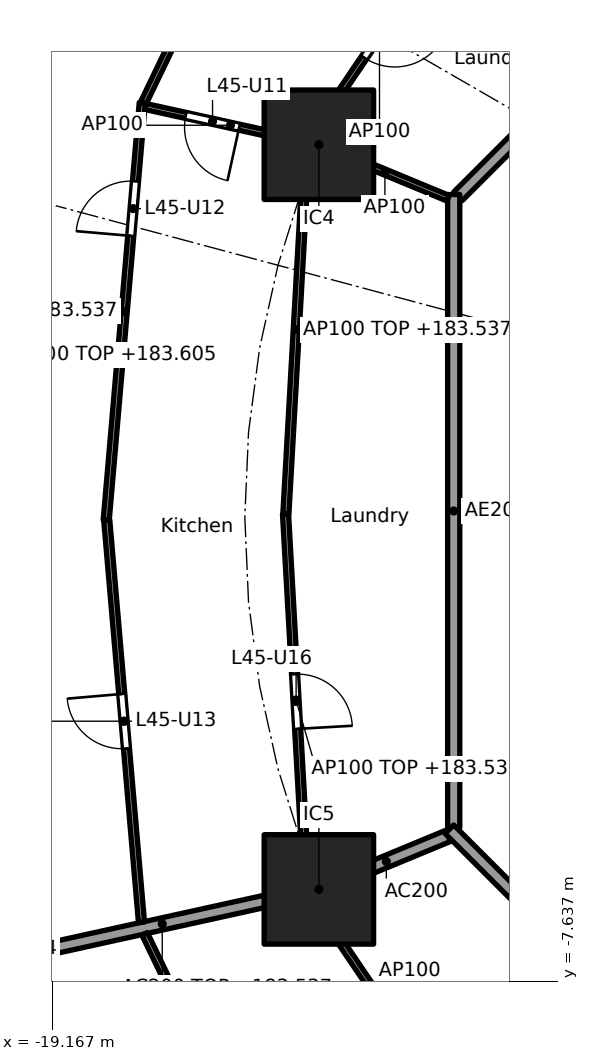
"""IFC4 building model, lengths in metres.
Left out: names, types, materials, properties, quantities, classifications, styles, units other than length and angle.
Written with IfcOpenShell. Run it as: python <this file> out.ifc"""

import sys

from ifc_helpers import new_model, si_unit, direction, frame, frame_2d, origin, origin_2d, place, context, subcontext, project, spatial, rectangle, extrude, element, fill, save


model = new_model("IFC4")
c1 = context("Model", 3, precision=1e-05, world=origin(), true_north=direction((0.0, 1.0)))
c2 = subcontext(c1, "Body", "Model", "MODEL_VIEW")
j1 = project(units=[si_unit("LENGTHUNIT", "METRE"), si_unit("PLANEANGLEUNIT", "RADIAN")], contexts=[c1])
p1 = place(None, origin())
s1 = spatial("IfcSite", under=j1, at=p1, CompositionType="ELEMENT")
p2 = place(p1, origin())
s2 = spatial("IfcBuilding", under=s1, at=p2, CompositionType="ELEMENT")
p3 = place(p2, frame((0.0, 0.0, 180.7)))
s3 = spatial("IfcBuildingStorey", under=s2, at=p3, CompositionType="ELEMENT", Elevation=180.7)
for number, where, z_axis, x_axis in (
    (1, (-14.782, 6.123, 0.0), (0.0, 0.0, 1.0), (1.0, 0.0, 0.0)),
    (2, (-14.782, -6.123, 0.0), (0.0, 0.0, 1.0), (1.0, 0.0, 0.0)),
):
    element("IfcColumn", number, at=place(p3, frame(where, z_axis=z_axis, x_axis=x_axis)), inside=s3, PredefinedType="COLUMN", context=c2, shape_type="SweptSolid", body=[
        extrude(rectangle(XDim=1.8, YDim=1.8, at=origin_2d()), origin(), (0.0, 0.0, 1.0), 3.7),
    ])
p4 = place(p3, frame((-12.657, -5.243, 0.0), z_axis=(0.0, 0.0, 1.0), x_axis=(-0.923859888513, -0.38273085373, 0.0)))
e3 = element("IfcWall", 3, at=p4, inside=s3, PredefinedType="PARTITIONING", context=c2, shape_type="SweptSolid", body=[
    extrude(rectangle(XDim=2.199, YDim=0.2, at=frame_2d((1.1, 0.0))), origin(), (0.0, 0.0, 1.0), 3.44),
])
p5 = place(p3, frame((-14.831, -6.134, 0.0), z_axis=(0.0, 0.0, 1.0), x_axis=(-0.976568396888, -0.215207263354, 0.0)))
e4 = element("IfcWall", 4, at=p5, inside=s3, PredefinedType="PARTITIONING", context=c2, shape_type="SweptSolid", body=[
    extrude(rectangle(XDim=5.177, YDim=0.2, at=frame_2d((2.588, 0.0))), origin(), (0.0, 0.0, 1.0), 2.837),
])
p6 = place(p3, frame((-5.275, 12.494, 0.0), z_axis=(0.0, 0.0, 1.0), x_axis=(-0.707106781187, -0.707106781187, 0.0)))
e5 = element("IfcWall", 5, at=p6, inside=s3, PredefinedType="PARTITIONING", context=c2, shape_type="SweptSolid", body=[
    extrude(rectangle(XDim=10.209, YDim=0.2, at=frame_2d((5.104, 0.0))), origin(), (0.0, 0.0, 1.0), 3.44),
])
p7 = place(p3, frame((-12.565, 5.304, 0.0), z_axis=(0.0, 0.0, 1.0), x_axis=(0.0, -1.0, 0.0)))
e6 = element("IfcWall", 6, at=p7, inside=s3, PredefinedType="PARTITIONING", context=c2, shape_type="SweptSolid", body=[
    extrude(rectangle(XDim=10.409, YDim=0.2, at=frame_2d((5.205, 0.0))), origin(), (0.0, 0.0, 1.0), 3.44),
])
p8 = place(p3, frame((-12.635, -5.134, 0.0), z_axis=(0.0, 0.0, 1.0), x_axis=(0.707106781187, -0.707106781187, 0.0)))
e7 = element("IfcWall", 7, at=p8, inside=s3, PredefinedType="PARTITIONING", context=c2, shape_type="SweptSolid", body=[
    extrude(rectangle(XDim=10.609, YDim=0.2, at=frame_2d((5.305, 0.0))), origin(), (0.0, 0.0, 1.0), 3.44),
])
p9 = place(p3, frame((-12.619, 9.65, 0.0), z_axis=(0.0, 0.0, 1.0), x_axis=(-0.561064907171, -0.827771810308, 0.0)))
e8 = element("IfcWall", 8, at=p9, inside=s3, PredefinedType="PARTITIONING", context=c2, shape_type="SweptSolid", body=[
    extrude(rectangle(XDim=4.159, YDim=0.1, at=frame_2d((2.079, 0.0))), origin(), (0.0, 0.0, 1.0), 3.44),
])
p10 = place(p9, frame((1.629, 0.0, 0.0)))
e9 = element("IfcOpeningElement", 9, at=p10, cuts=e8, PredefinedType="OPENING", context=c2, shape_type="SweptSolid", body=[
    extrude(rectangle(XDim=0.9, YDim=2.1, at=frame_2d((0.45, 1.05))), frame((0.0, 0.06, 0.0), z_axis=(0.0, -1.0, 0.0), x_axis=(1.0, 0.0, 0.0)), (0.0, 0.0, 1.0), 0.12),
])
p11 = place(p3, frame((-15.257, 11.816, 0.0), z_axis=(0.0, 0.0, 1.0), x_axis=(-0.434040130629, -0.900893536997, 0.0)))
e10 = element("IfcWall", 10, at=p11, inside=s3, PredefinedType="PARTITIONING", context=c2, shape_type="SweptSolid", body=[
    extrude(rectangle(XDim=5.558, YDim=0.1, at=frame_2d((2.779, 0.0))), origin(), (0.0, 0.0, 1.0), 3.44),
])
p12 = place(p3, frame((-12.657, 5.243, 0.0), z_axis=(0.0, 0.0, 1.0), x_axis=(-0.923848837015, 0.382757529444, 0.0)))
e11 = element("IfcWall", 11, at=p12, inside=s3, PredefinedType="PARTITIONING", context=c2, shape_type="SweptSolid", body=[
    extrude(rectangle(XDim=2.25, YDim=0.1, at=frame_2d((1.125, 0.0))), origin(), (0.0, 0.0, 1.0), 3.44),
])
p13 = place(p3, frame((-14.831, 6.134, 0.0), z_axis=(0.0, 0.0, 1.0), x_axis=(-0.976560749847, 0.215241961191, 0.0)))
e12 = element("IfcWall", 12, at=p13, inside=s3, PredefinedType="PARTITIONING", context=c2, shape_type="SweptSolid", body=[
    extrude(rectangle(XDim=2.879, YDim=0.1, at=frame_2d((1.439, 0.0))), origin(), (0.0, 0.0, 1.0), 3.44),
])
p14 = place(p13, frame((1.291, 0.0, 0.0)))
e13 = element("IfcOpeningElement", 13, at=p14, cuts=e12, PredefinedType="OPENING", context=c2, shape_type="SweptSolid", body=[
    extrude(rectangle(XDim=0.9, YDim=2.1, at=frame_2d((0.45, 1.05))), frame((0.0, 0.06, 0.0), z_axis=(0.0, -1.0, 0.0), x_axis=(1.0, 0.0, 0.0)), (0.0, 0.0, 1.0), 0.12),
])
p15 = place(p3, frame((-14.983, 6.117, 0.0), z_axis=(0.0, 0.0, 1.0), x_axis=(-0.056328933432, -0.998412265178, 0.0)))
e14 = element("IfcWall", 14, at=p15, inside=s3, PredefinedType="PARTITIONING", context=c2, shape_type="SweptSolid", body=[
    extrude(rectangle(XDim=6.077, YDim=0.1, at=frame_2d((3.038, 0.0))), origin(), (0.0, 0.0, 1.0), 2.837),
])
p16 = place(p3, frame((-17.687, 6.814, 0.0), z_axis=(0.0, 0.0, 1.0), x_axis=(-0.086010249709, -0.996294252189, 0.0)))
e15 = element("IfcWall", 15, at=p16, inside=s3, PredefinedType="PARTITIONING", context=c2, shape_type="SweptSolid", body=[
    extrude(rectangle(XDim=6.889, YDim=0.1, at=frame_2d((3.445, 0.0))), origin(), (0.0, 0.0, 1.0), 2.837),
])
p17 = place(p16, frame((1.297, 0.0, 0.0)))
e16 = element("IfcOpeningElement", 16, at=p17, cuts=e15, PredefinedType="OPENING", context=c2, shape_type="SweptSolid", body=[
    extrude(rectangle(XDim=0.9, YDim=2.1, at=frame_2d((0.45, 1.05))), frame((0.0, 0.06, 0.0), z_axis=(0.0, -1.0, 0.0), x_axis=(1.0, 0.0, 0.0)), (0.0, 0.0, 1.0), 0.12),
])
p18 = place(p3, frame((-18.033, 3.387, 0.0), z_axis=(0.0, 0.0, 1.0), x_axis=(-0.994194772207, 0.107595329438, 0.0)))
e17 = element("IfcWall", 17, at=p18, inside=s3, PredefinedType="PARTITIONING", context=c2, shape_type="SweptSolid", body=[
    extrude(rectangle(XDim=3.506, YDim=0.1, at=frame_2d((1.753, 0.0))), origin(), (0.0, 0.0, 1.0), 2.905),
])
p19 = place(p3, frame((-15.331, 0.05, 0.0), z_axis=(0.0, 0.0, 1.0), x_axis=(0.056310939406, -0.998413280212, 0.0)))
e18 = element("IfcWall", 18, at=p19, inside=s3, PredefinedType="PARTITIONING", context=c2, shape_type="SweptSolid", body=[
    extrude(rectangle(XDim=6.126, YDim=0.1, at=frame_2d((3.063, 0.0))), origin(), (0.0, 0.0, 1.0), 2.837),
])
p20 = place(p19, frame((2.638, 0.0, 0.0)))
e19 = element("IfcOpeningElement", 19, at=p20, cuts=e18, PredefinedType="OPENING", context=c2, shape_type="SweptSolid", body=[
    extrude(rectangle(XDim=0.9, YDim=2.1, at=frame_2d((0.45, 1.05))), frame((0.0, 0.06, 0.0), z_axis=(0.0, -1.0, 0.0), x_axis=(1.0, 0.0, 0.0)), (0.0, 0.0, 1.0), 0.12),
])
p21 = place(p3, frame((-18.271, -0.05, 0.0), z_axis=(0.0, 0.0, 1.0), x_axis=(0.086012321907, -0.996294073294, 0.0)))
e20 = element("IfcWall", 20, at=p21, inside=s3, PredefinedType="PARTITIONING", context=c2, shape_type="SweptSolid", body=[
    extrude(rectangle(XDim=6.639, YDim=0.1, at=frame_2d((3.32, 0.0))), origin(), (0.0, 0.0, 1.0), 2.837),
])
p22 = place(p21, frame((2.87, 0.0, 0.0)))
e21 = element("IfcOpeningElement", 21, at=p22, cuts=e20, PredefinedType="OPENING", context=c2, shape_type="SweptSolid", body=[
    extrude(rectangle(XDim=0.9, YDim=2.1, at=frame_2d((0.45, 1.05))), frame((0.0, 0.06, 0.0), z_axis=(0.0, -1.0, 0.0), x_axis=(1.0, 0.0, 0.0)), (0.0, 0.0, 1.0), 0.12),
])
p23 = place(p3, frame((-14.924, -6.249, 0.0), z_axis=(0.0, 0.0, 1.0), x_axis=(0.561046521684, -0.82778427172, 0.0)))
e22 = element("IfcWall", 22, at=p23, inside=s3, PredefinedType="PARTITIONING", context=c2, shape_type="SweptSolid", body=[
    extrude(rectangle(XDim=4.109, YDim=0.1, at=frame_2d((2.054, 0.0))), origin(), (0.0, 0.0, 1.0), 3.44),
])
p24 = place(p3, frame((-17.647, -6.854, 0.0), z_axis=(0.0, 0.0, 1.0), x_axis=(0.434027506504, -0.900899619046, 0.0)))
e23 = element("IfcWall", 23, at=p24, inside=s3, PredefinedType="PARTITIONING", context=c2, shape_type="SweptSolid", body=[
    extrude(rectangle(XDim=5.508, YDim=0.1, at=frame_2d((2.754, 0.0))), origin(), (0.0, 0.0, 1.0), 3.44),
])
p25 = place(p24, frame((2.304, 0.0, 0.0)))
e24 = element("IfcOpeningElement", 24, at=p25, cuts=e23, PredefinedType="OPENING", context=c2, shape_type="SweptSolid", body=[
    extrude(rectangle(XDim=0.9, YDim=2.1, at=frame_2d((0.45, 1.05))), frame((0.0, 0.06, 0.0), z_axis=(0.0, -1.0, 0.0), x_axis=(1.0, 0.0, 0.0)), (0.0, 0.0, 1.0), 0.12),
])
p26 = place(p14, origin())
e25 = element("IfcDoor", 25, at=p26, inside=s3, OperationType="SINGLE_SWING_LEFT", PredefinedType="DOOR", context=c2, shape_type="SweptSolid", body=[
    extrude(rectangle(XDim=0.9, YDim=2.1, at=frame_2d((0.45, 1.05))), frame((0.0, 0.025, 0.0), z_axis=(0.0, -1.0, 0.0), x_axis=(1.0, 0.0, 0.0)), (0.0, 0.0, 1.0), 0.05),
])
fill(e13, e25)
p27 = place(p17, frame((0.9, 0.0, 0.0), x_axis=(-1.0, 0.0, 0.0)))
e26 = element("IfcDoor", 26, at=p27, inside=s3, OperationType="SINGLE_SWING_LEFT", PredefinedType="DOOR", context=c2, shape_type="SweptSolid", body=[
    extrude(rectangle(XDim=0.9, YDim=2.1, at=frame_2d((0.45, 1.05))), frame((0.0, 0.025, 0.0), z_axis=(0.0, -1.0, 0.0), x_axis=(1.0, 0.0, 0.0)), (0.0, 0.0, 1.0), 0.05),
])
fill(e16, e26)
p28 = place(p22, frame((0.9, 0.0, 0.0), x_axis=(-1.0, 0.0, 0.0)))
e27 = element("IfcDoor", 27, at=p28, inside=s3, OperationType="SINGLE_SWING_RIGHT", PredefinedType="DOOR", context=c2, shape_type="SweptSolid", body=[
    extrude(rectangle(XDim=0.9, YDim=2.1, at=frame_2d((0.45, 1.05))), frame((0.0, 0.025, 0.0), z_axis=(0.0, -1.0, 0.0), x_axis=(1.0, 0.0, 0.0)), (0.0, 0.0, 1.0), 0.05),
])
fill(e21, e27)
p29 = place(p10, origin())
e28 = element("IfcDoor", 28, at=p29, inside=s3, OperationType="SINGLE_SWING_LEFT", PredefinedType="DOOR", context=c2, shape_type="SweptSolid", body=[
    extrude(rectangle(XDim=0.9, YDim=2.1, at=frame_2d((0.45, 1.05))), frame((0.0, 0.025, 0.0), z_axis=(0.0, -1.0, 0.0), x_axis=(1.0, 0.0, 0.0)), (0.0, 0.0, 1.0), 0.05),
])
fill(e9, e28)
p30 = place(p20, origin())
e29 = element("IfcDoor", 29, at=p30, inside=s3, OperationType="SINGLE_SWING_RIGHT", PredefinedType="DOOR", context=c2, shape_type="SweptSolid", body=[
    extrude(rectangle(XDim=0.9, YDim=2.1, at=frame_2d((0.45, 1.05))), frame((0.0, 0.025, 0.0), z_axis=(0.0, -1.0, 0.0), x_axis=(1.0, 0.0, 0.0)), (0.0, 0.0, 1.0), 0.05),
])
fill(e19, e29)
save(model, sys.argv[1])
